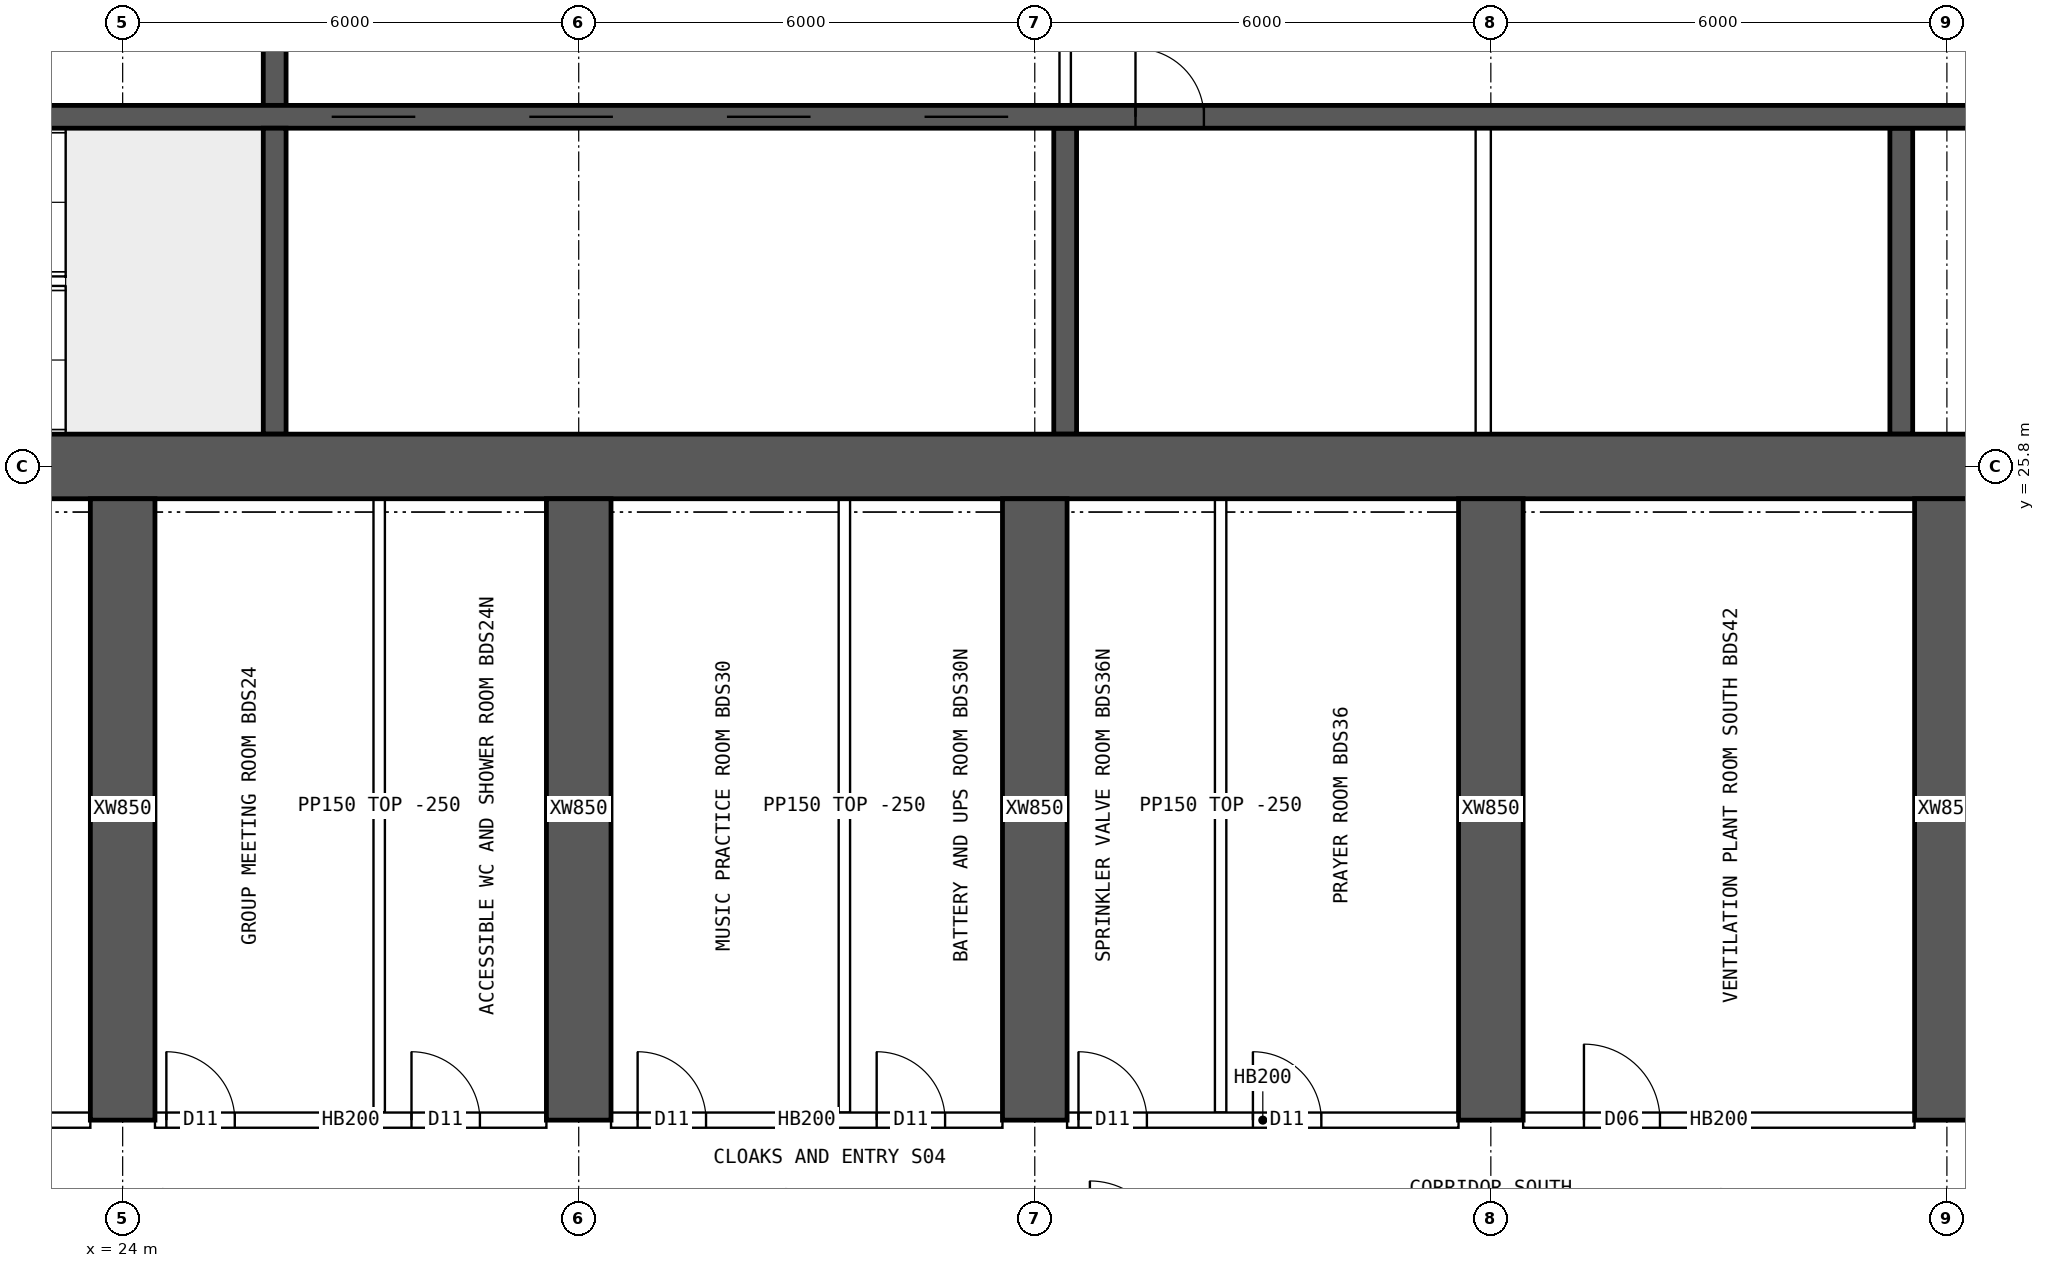
"""IFC4 building model, lengths in metres.
Left out: names, types, materials, properties, quantities, classifications, styles, units other than length and angle.
Written with IfcOpenShell. Run it as: python <this file> out.ifc"""

import sys

from ifc_helpers import new_model, si_unit, direction, frame, frame_2d, origin, place, context, subcontext, project, spatial, rectangle, extrude, element, fill, save


model = new_model("IFC4")
c1 = context("Model", 3, precision=1e-05, world=origin(), true_north=direction((0.0, 1.0)))
c2 = subcontext(c1, "Body", "Model", "MODEL_VIEW")
j1 = project(units=[si_unit("LENGTHUNIT", "METRE"), si_unit("PLANEANGLEUNIT", "RADIAN")], contexts=[c1])
p1 = place(None, origin())
s1 = spatial("IfcSite", under=j1, at=p1, CompositionType="ELEMENT")
p2 = place(p1, origin())
s2 = spatial("IfcBuilding", under=s1, at=p2, CompositionType="ELEMENT")
p3 = place(p2, frame((0.0, 0.0, 163.6)))
s3 = spatial("IfcBuildingStorey", under=s2, at=p3, CompositionType="ELEMENT", Elevation=163.6)
p4 = place(p3, frame((18.0, 25.8, 0.0), z_axis=(0.0, 0.0, 1.0), x_axis=(1.0, 0.0, 0.0)))
e1 = element("IfcWall", 1, at=p4, inside=s3, PredefinedType="SHEAR", context=c2, shape_type="SweptSolid", body=[
    extrude(rectangle(XDim=48.0, YDim=0.85, at=frame_2d((24.0, 0.0))), origin(), (0.0, 0.0, 1.0), 3.75),
])
p5 = place(p3, frame((18.425, 30.4, 0.0), z_axis=(0.0, 0.0, 1.0), x_axis=(1.0, 0.0, 0.0)))
e2 = element("IfcWall", 2, at=p5, inside=s3, PredefinedType="SHEAR", context=c2, shape_type="SweptSolid", body=[
    extrude(rectangle(XDim=47.15, YDim=0.3, at=frame_2d((23.575, 0.0))), origin(), (0.0, 0.0, 1.0), 3.75),
])
p6 = place(p5, frame((0.4, 0.0, 0.0)))
e3 = element("IfcOpeningElement", 3, at=p6, cuts=e2, PredefinedType="OPENING", context=c2, shape_type="SweptSolid", body=[
    extrude(rectangle(XDim=1.0, YDim=2.1, at=frame_2d((0.5, 1.05))), frame((0.0, 0.16, 0.0), z_axis=(0.0, -1.0, 0.0), x_axis=(1.0, 0.0, 0.0)), (0.0, 0.0, 1.0), 0.32),
])
p7 = place(p5, frame((45.75, 0.0, 0.0)))
e4 = element("IfcOpeningElement", 4, at=p7, cuts=e2, PredefinedType="OPENING", context=c2, shape_type="SweptSolid", body=[
    extrude(rectangle(XDim=1.0, YDim=2.1, at=frame_2d((0.5, 1.05))), frame((0.0, 0.16, 0.0), z_axis=(0.0, -1.0, 0.0), x_axis=(1.0, 0.0, 0.0)), (0.0, 0.0, 1.0), 0.32),
])
p8 = place(p5, frame((8.325, 0.0, 0.0)))
e5 = element("IfcOpeningElement", 5, at=p8, cuts=e2, PredefinedType="OPENING", context=c2, shape_type="SweptSolid", body=[
    extrude(rectangle(XDim=1.1, YDim=2.1, at=frame_2d((0.55, 1.05))), frame((0.0, 0.16, 0.0), z_axis=(0.0, -1.0, 0.0), x_axis=(1.0, 0.0, 0.0)), (0.0, 0.0, 1.0), 0.32),
])
p9 = place(p5, frame((10.925, 0.0, 0.0)))
e6 = element("IfcOpeningElement", 6, at=p9, cuts=e2, PredefinedType="OPENING", context=c2, shape_type="SweptSolid", body=[
    extrude(rectangle(XDim=1.1, YDim=2.1, at=frame_2d((0.55, 1.05))), frame((0.0, 0.16, 0.0), z_axis=(0.0, -1.0, 0.0), x_axis=(1.0, 0.0, 0.0)), (0.0, 0.0, 1.0), 0.32),
])
p10 = place(p5, frame((13.525, 0.0, 0.0)))
e7 = element("IfcOpeningElement", 7, at=p10, cuts=e2, PredefinedType="OPENING", context=c2, shape_type="SweptSolid", body=[
    extrude(rectangle(XDim=1.1, YDim=2.1, at=frame_2d((0.55, 1.05))), frame((0.0, 0.16, 0.0), z_axis=(0.0, -1.0, 0.0), x_axis=(1.0, 0.0, 0.0)), (0.0, 0.0, 1.0), 0.32),
])
p11 = place(p5, frame((16.125, 0.0, 0.0)))
e8 = element("IfcOpeningElement", 8, at=p11, cuts=e2, PredefinedType="OPENING", context=c2, shape_type="SweptSolid", body=[
    extrude(rectangle(XDim=1.1, YDim=2.1, at=frame_2d((0.55, 1.05))), frame((0.0, 0.16, 0.0), z_axis=(0.0, -1.0, 0.0), x_axis=(1.0, 0.0, 0.0)), (0.0, 0.0, 1.0), 0.32),
])
p12 = place(p5, frame((18.9, 0.0, 0.0)))
e9 = element("IfcOpeningElement", 9, at=p12, cuts=e2, PredefinedType="OPENING", context=c2, shape_type="SweptSolid", body=[
    extrude(rectangle(XDim=0.9, YDim=2.1, at=frame_2d((0.45, 1.05))), frame((0.0, 0.16, 0.0), z_axis=(0.0, -1.0, 0.0), x_axis=(1.0, 0.0, 0.0)), (0.0, 0.0, 1.0), 0.32),
])
p13 = place(p5, frame((30.192, 0.0, 0.0)))
e10 = element("IfcOpeningElement", 10, at=p13, cuts=e2, PredefinedType="OPENING", context=c2, shape_type="SweptSolid", body=[
    extrude(rectangle(XDim=1.1, YDim=2.1, at=frame_2d((0.55, 1.05))), frame((0.0, 0.16, 0.0), z_axis=(0.0, -1.0, 0.0), x_axis=(1.0, 0.0, 0.0)), (0.0, 0.0, 1.0), 0.32),
])
p14 = place(p5, frame((33.725, 0.0, 0.0)))
e11 = element("IfcOpeningElement", 11, at=p14, cuts=e2, PredefinedType="OPENING", context=c2, shape_type="SweptSolid", body=[
    extrude(rectangle(XDim=1.1, YDim=2.1, at=frame_2d((0.55, 1.05))), frame((0.0, 0.16, 0.0), z_axis=(0.0, -1.0, 0.0), x_axis=(1.0, 0.0, 0.0)), (0.0, 0.0, 1.0), 0.32),
])
p15 = place(p5, frame((37.258, 0.0, 0.0)))
e12 = element("IfcOpeningElement", 12, at=p15, cuts=e2, PredefinedType="OPENING", context=c2, shape_type="SweptSolid", body=[
    extrude(rectangle(XDim=1.1, YDim=2.1, at=frame_2d((0.55, 1.05))), frame((0.0, 0.16, 0.0), z_axis=(0.0, -1.0, 0.0), x_axis=(1.0, 0.0, 0.0)), (0.0, 0.0, 1.0), 0.32),
])
p16 = place(p3, frame((26.0, 26.225, 0.0), z_axis=(0.0, 0.0, 1.0), x_axis=(0.0, 1.0, 0.0)))
e13 = element("IfcWall", 13, at=p16, inside=s3, PredefinedType="SHEAR", context=c2, shape_type="SweptSolid", body=[
    extrude(rectangle(XDim=4.025, YDim=0.3, at=frame_2d((2.012, 0.0))), origin(), (0.0, 0.0, 1.0), 3.75),
])
p17 = place(p3, frame((26.0, 30.55, 0.0), z_axis=(0.0, 0.0, 1.0), x_axis=(0.0, 1.0, 0.0)))
e14 = element("IfcWall", 14, at=p17, inside=s3, PredefinedType="SHEAR", context=c2, shape_type="SweptSolid", body=[
    extrude(rectangle(XDim=3.9, YDim=0.3, at=frame_2d((1.95, 0.0))), origin(), (0.0, 0.0, 1.0), 3.75),
])
p18 = place(p17, frame((1.4, 0.0, 0.0)))
e15 = element("IfcOpeningElement", 15, at=p18, cuts=e14, PredefinedType="OPENING", context=c2, shape_type="SweptSolid", body=[
    extrude(rectangle(XDim=1.2, YDim=2.1, at=frame_2d((0.6, 1.05))), frame((0.0, 0.16, 0.0), z_axis=(0.0, -1.0, 0.0), x_axis=(1.0, 0.0, 0.0)), (0.0, 0.0, 1.0), 0.32),
])
for number, where, z_axis, x_axis in (
    (16, (36.4, 26.225, 0.0), (0.0, 0.0, 1.0), (0.0, 1.0, 0.0)),
    (17, (47.4, 26.225, 0.0), (0.0, 0.0, 1.0), (0.0, 1.0, 0.0)),
):
    element("IfcWall", number, at=place(p3, frame(where, z_axis=z_axis, x_axis=x_axis)), inside=s3, PredefinedType="SHEAR", context=c2, shape_type="SweptSolid", body=[
        extrude(rectangle(XDim=4.025, YDim=0.3, at=frame_2d((2.012, 0.0))), origin(), (0.0, 0.0, 1.0), 3.75),
    ])
for number, where, z_axis, x_axis in (
    (18, (24.0, 17.2, 0.0), (0.0, 0.0, 1.0), (0.0, 1.0, 0.0)),
    (19, (30.0, 17.2, 0.0), (0.0, 0.0, 1.0), (0.0, 1.0, 0.0)),
    (20, (36.0, 17.2, 0.0), (0.0, 0.0, 1.0), (0.0, 1.0, 0.0)),
    (21, (42.0, 17.2, 0.0), (0.0, 0.0, 1.0), (0.0, 1.0, 0.0)),
    (22, (48.0, 17.2, 0.0), (0.0, 0.0, 1.0), (0.0, 1.0, 0.0)),
):
    element("IfcWall", number, at=place(p3, frame(where, z_axis=z_axis, x_axis=x_axis)), inside=s3, PredefinedType="SHEAR", context=c2, shape_type="SweptSolid", body=[
        extrude(rectangle(XDim=8.175, YDim=0.85, at=frame_2d((4.087, 0.0))), origin(), (0.0, 0.0, 1.0), 3.75),
    ])
p19 = place(p3, frame((36.4, 30.55, 0.0), z_axis=(0.0, 0.0, 1.0), x_axis=(0.0, 1.0, 0.0)))
e23 = element("IfcWall", 23, at=p19, inside=s3, PredefinedType="SOLIDWALL", context=c2, shape_type="SweptSolid", body=[
    extrude(rectangle(XDim=3.9, YDim=0.15, at=frame_2d((1.95, 0.0))), origin(), (0.0, 0.0, 1.0), 3.5),
])
p20 = place(p19, frame((1.15, 0.0, 0.0)))
e24 = element("IfcOpeningElement", 24, at=p20, cuts=e23, PredefinedType="OPENING", context=c2, shape_type="SweptSolid", body=[
    extrude(rectangle(XDim=1.6, YDim=2.1, at=frame_2d((0.8, 1.05))), frame((0.0, 0.085, 0.0), z_axis=(0.0, -1.0, 0.0), x_axis=(1.0, 0.0, 0.0)), (0.0, 0.0, 1.0), 0.17),
])
p21 = place(p3, frame((41.9, 26.225, 0.0), z_axis=(0.0, 0.0, 1.0), x_axis=(0.0, 1.0, 0.0)))
e25 = element("IfcWall", 25, at=p21, inside=s3, PredefinedType="SOLIDWALL", context=c2, shape_type="SweptSolid", body=[
    extrude(rectangle(XDim=4.025, YDim=0.2, at=frame_2d((2.012, 0.0))), origin(), (0.0, 0.0, 1.0), 3.5),
])
p22 = place(p3, frame((18.425, 17.2, 0.0), z_axis=(0.0, 0.0, 1.0), x_axis=(1.0, 0.0, 0.0)))
e26 = element("IfcWall", 26, at=p22, inside=s3, PredefinedType="SOLIDWALL", context=c2, shape_type="SweptSolid", body=[
    extrude(rectangle(XDim=5.15, YDim=0.2, at=frame_2d((2.575, 0.0))), origin(), (0.0, 0.0, 1.0), 3.5),
])
p23 = place(p22, frame((0.8, 0.0, 0.0)))
e27 = element("IfcOpeningElement", 27, at=p23, cuts=e26, PredefinedType="OPENING", context=c2, shape_type="SweptSolid", body=[
    extrude(rectangle(XDim=1.0, YDim=2.1, at=frame_2d((0.5, 1.05))), frame((0.0, 0.11, 0.0), z_axis=(0.0, -1.0, 0.0), x_axis=(1.0, 0.0, 0.0)), (0.0, 0.0, 1.0), 0.22),
])
p24 = place(p3, frame((24.425, 17.2, 0.0), z_axis=(0.0, 0.0, 1.0), x_axis=(1.0, 0.0, 0.0)))
e28 = element("IfcWall", 28, at=p24, inside=s3, PredefinedType="SOLIDWALL", context=c2, shape_type="SweptSolid", body=[
    extrude(rectangle(XDim=5.15, YDim=0.2, at=frame_2d((2.575, 0.0))), origin(), (0.0, 0.0, 1.0), 3.5),
])
p25 = place(p24, frame((0.15, 0.0, 0.0)))
e29 = element("IfcOpeningElement", 29, at=p25, cuts=e28, PredefinedType="OPENING", context=c2, shape_type="SweptSolid", body=[
    extrude(rectangle(XDim=0.9, YDim=2.1, at=frame_2d((0.45, 1.05))), frame((0.0, 0.11, 0.0), z_axis=(0.0, -1.0, 0.0), x_axis=(1.0, 0.0, 0.0)), (0.0, 0.0, 1.0), 0.22),
])
p26 = place(p24, frame((3.375, 0.0, 0.0)))
e30 = element("IfcOpeningElement", 30, at=p26, cuts=e28, PredefinedType="OPENING", context=c2, shape_type="SweptSolid", body=[
    extrude(rectangle(XDim=0.9, YDim=2.1, at=frame_2d((0.45, 1.05))), frame((0.0, 0.11, 0.0), z_axis=(0.0, -1.0, 0.0), x_axis=(1.0, 0.0, 0.0)), (0.0, 0.0, 1.0), 0.22),
])
p27 = place(p3, frame((30.425, 17.2, 0.0), z_axis=(0.0, 0.0, 1.0), x_axis=(1.0, 0.0, 0.0)))
e31 = element("IfcWall", 31, at=p27, inside=s3, PredefinedType="SOLIDWALL", context=c2, shape_type="SweptSolid", body=[
    extrude(rectangle(XDim=5.15, YDim=0.2, at=frame_2d((2.575, 0.0))), origin(), (0.0, 0.0, 1.0), 3.5),
])
p28 = place(p27, frame((0.35, 0.0, 0.0)))
e32 = element("IfcOpeningElement", 32, at=p28, cuts=e31, PredefinedType="OPENING", context=c2, shape_type="SweptSolid", body=[
    extrude(rectangle(XDim=0.9, YDim=2.1, at=frame_2d((0.45, 1.05))), frame((0.0, 0.11, 0.0), z_axis=(0.0, -1.0, 0.0), x_axis=(1.0, 0.0, 0.0)), (0.0, 0.0, 1.0), 0.22),
])
p29 = place(p27, frame((3.495, 0.0, 0.0)))
e33 = element("IfcOpeningElement", 33, at=p29, cuts=e31, PredefinedType="OPENING", context=c2, shape_type="SweptSolid", body=[
    extrude(rectangle(XDim=0.9, YDim=2.1, at=frame_2d((0.45, 1.05))), frame((0.0, 0.11, 0.0), z_axis=(0.0, -1.0, 0.0), x_axis=(1.0, 0.0, 0.0)), (0.0, 0.0, 1.0), 0.22),
])
p30 = place(p3, frame((36.425, 17.2, 0.0), z_axis=(0.0, 0.0, 1.0), x_axis=(1.0, 0.0, 0.0)))
e34 = element("IfcWall", 34, at=p30, inside=s3, PredefinedType="SOLIDWALL", context=c2, shape_type="SweptSolid", body=[
    extrude(rectangle(XDim=5.15, YDim=0.2, at=frame_2d((2.575, 0.0))), origin(), (0.0, 0.0, 1.0), 3.5),
])
p31 = place(p30, frame((0.15, 0.0, 0.0)))
e35 = element("IfcOpeningElement", 35, at=p31, cuts=e34, PredefinedType="OPENING", context=c2, shape_type="SweptSolid", body=[
    extrude(rectangle(XDim=0.9, YDim=2.1, at=frame_2d((0.45, 1.05))), frame((0.0, 0.11, 0.0), z_axis=(0.0, -1.0, 0.0), x_axis=(1.0, 0.0, 0.0)), (0.0, 0.0, 1.0), 0.22),
])
p32 = place(p30, frame((2.445, 0.0, 0.0)))
e36 = element("IfcOpeningElement", 36, at=p32, cuts=e34, PredefinedType="OPENING", context=c2, shape_type="SweptSolid", body=[
    extrude(rectangle(XDim=0.9, YDim=2.1, at=frame_2d((0.45, 1.05))), frame((0.0, 0.11, 0.0), z_axis=(0.0, -1.0, 0.0), x_axis=(1.0, 0.0, 0.0)), (0.0, 0.0, 1.0), 0.22),
])
p33 = place(p3, frame((42.425, 17.2, 0.0), z_axis=(0.0, 0.0, 1.0), x_axis=(1.0, 0.0, 0.0)))
e37 = element("IfcWall", 37, at=p33, inside=s3, PredefinedType="SOLIDWALL", context=c2, shape_type="SweptSolid", body=[
    extrude(rectangle(XDim=5.15, YDim=0.2, at=frame_2d((2.575, 0.0))), origin(), (0.0, 0.0, 1.0), 3.5),
])
p34 = place(p33, frame((0.8, 0.0, 0.0)))
e38 = element("IfcOpeningElement", 38, at=p34, cuts=e37, PredefinedType="OPENING", context=c2, shape_type="SweptSolid", body=[
    extrude(rectangle(XDim=1.0, YDim=2.1, at=frame_2d((0.5, 1.05))), frame((0.0, 0.11, 0.0), z_axis=(0.0, -1.0, 0.0), x_axis=(1.0, 0.0, 0.0)), (0.0, 0.0, 1.0), 0.22),
])
for number, where, z_axis, x_axis in (
    (39, (27.375, 17.3, 0.0), (0.0, 0.0, 1.0), (0.0, 1.0, 0.0)),
    (40, (33.495, 17.3, 0.0), (0.0, 0.0, 1.0), (0.0, 1.0, 0.0)),
    (41, (38.445, 17.3, 0.0), (0.0, 0.0, 1.0), (0.0, 1.0, 0.0)),
):
    element("IfcWall", number, at=place(p3, frame(where, z_axis=z_axis, x_axis=x_axis)), inside=s3, PredefinedType="PARTITIONING", context=c2, shape_type="SweptSolid", body=[
        extrude(rectangle(XDim=8.075, YDim=0.15, at=frame_2d((4.038, 0.0))), origin(), (0.0, 0.0, 1.0), 3.5),
    ])
p35 = place(p8, origin())
e42 = element("IfcDoor", 42, at=p35, inside=s3, OperationType="DOUBLE_DOOR_SLIDING", PredefinedType="DOOR", context=c2, shape_type="SweptSolid", body=[
    extrude(rectangle(XDim=1.1, YDim=2.1, at=frame_2d((0.55, 1.05))), frame((0.0, 0.025, 0.0), z_axis=(0.0, -1.0, 0.0), x_axis=(1.0, 0.0, 0.0)), (0.0, 0.0, 1.0), 0.05),
])
fill(e5, e42)
p36 = place(p9, origin())
e43 = element("IfcDoor", 43, at=p36, inside=s3, OperationType="DOUBLE_DOOR_SLIDING", PredefinedType="DOOR", context=c2, shape_type="SweptSolid", body=[
    extrude(rectangle(XDim=1.1, YDim=2.1, at=frame_2d((0.55, 1.05))), frame((0.0, 0.025, 0.0), z_axis=(0.0, -1.0, 0.0), x_axis=(1.0, 0.0, 0.0)), (0.0, 0.0, 1.0), 0.05),
])
fill(e6, e43)
p37 = place(p10, origin())
e44 = element("IfcDoor", 44, at=p37, inside=s3, OperationType="DOUBLE_DOOR_SLIDING", PredefinedType="DOOR", context=c2, shape_type="SweptSolid", body=[
    extrude(rectangle(XDim=1.1, YDim=2.1, at=frame_2d((0.55, 1.05))), frame((0.0, 0.025, 0.0), z_axis=(0.0, -1.0, 0.0), x_axis=(1.0, 0.0, 0.0)), (0.0, 0.0, 1.0), 0.05),
])
fill(e7, e44)
p38 = place(p11, origin())
e45 = element("IfcDoor", 45, at=p38, inside=s3, OperationType="DOUBLE_DOOR_SLIDING", PredefinedType="DOOR", context=c2, shape_type="SweptSolid", body=[
    extrude(rectangle(XDim=1.1, YDim=2.1, at=frame_2d((0.55, 1.05))), frame((0.0, 0.025, 0.0), z_axis=(0.0, -1.0, 0.0), x_axis=(1.0, 0.0, 0.0)), (0.0, 0.0, 1.0), 0.05),
])
fill(e8, e45)
p39 = place(p12, origin())
e46 = element("IfcDoor", 46, at=p39, inside=s3, OperationType="SINGLE_SWING_LEFT", PredefinedType="DOOR", context=c2, shape_type="SweptSolid", body=[
    extrude(rectangle(XDim=0.9, YDim=2.1, at=frame_2d((0.45, 1.05))), frame((0.0, 0.025, 0.0), z_axis=(0.0, -1.0, 0.0), x_axis=(1.0, 0.0, 0.0)), (0.0, 0.0, 1.0), 0.05),
])
fill(e9, e46)
p40 = place(p25, origin())
e47 = element("IfcDoor", 47, at=p40, inside=s3, OperationType="SINGLE_SWING_LEFT", PredefinedType="DOOR", context=c2, shape_type="SweptSolid", body=[
    extrude(rectangle(XDim=0.9, YDim=2.1, at=frame_2d((0.45, 1.05))), frame((0.0, 0.025, 0.0), z_axis=(0.0, -1.0, 0.0), x_axis=(1.0, 0.0, 0.0)), (0.0, 0.0, 1.0), 0.05),
])
fill(e29, e47)
p41 = place(p26, origin())
e48 = element("IfcDoor", 48, at=p41, inside=s3, OperationType="SINGLE_SWING_LEFT", PredefinedType="DOOR", context=c2, shape_type="SweptSolid", body=[
    extrude(rectangle(XDim=0.9, YDim=2.1, at=frame_2d((0.45, 1.05))), frame((0.0, 0.025, 0.0), z_axis=(0.0, -1.0, 0.0), x_axis=(1.0, 0.0, 0.0)), (0.0, 0.0, 1.0), 0.05),
])
fill(e30, e48)
p42 = place(p28, origin())
e49 = element("IfcDoor", 49, at=p42, inside=s3, OperationType="SINGLE_SWING_LEFT", PredefinedType="DOOR", context=c2, shape_type="SweptSolid", body=[
    extrude(rectangle(XDim=0.9, YDim=2.1, at=frame_2d((0.45, 1.05))), frame((0.0, 0.025, 0.0), z_axis=(0.0, -1.0, 0.0), x_axis=(1.0, 0.0, 0.0)), (0.0, 0.0, 1.0), 0.05),
])
fill(e32, e49)
p43 = place(p29, origin())
e50 = element("IfcDoor", 50, at=p43, inside=s3, OperationType="SINGLE_SWING_LEFT", PredefinedType="DOOR", context=c2, shape_type="SweptSolid", body=[
    extrude(rectangle(XDim=0.9, YDim=2.1, at=frame_2d((0.45, 1.05))), frame((0.0, 0.025, 0.0), z_axis=(0.0, -1.0, 0.0), x_axis=(1.0, 0.0, 0.0)), (0.0, 0.0, 1.0), 0.05),
])
fill(e33, e50)
p44 = place(p31, origin())
e51 = element("IfcDoor", 51, at=p44, inside=s3, OperationType="SINGLE_SWING_LEFT", PredefinedType="DOOR", context=c2, shape_type="SweptSolid", body=[
    extrude(rectangle(XDim=0.9, YDim=2.1, at=frame_2d((0.45, 1.05))), frame((0.0, 0.025, 0.0), z_axis=(0.0, -1.0, 0.0), x_axis=(1.0, 0.0, 0.0)), (0.0, 0.0, 1.0), 0.05),
])
fill(e35, e51)
p45 = place(p32, origin())
e52 = element("IfcDoor", 52, at=p45, inside=s3, OperationType="SINGLE_SWING_LEFT", PredefinedType="DOOR", context=c2, shape_type="SweptSolid", body=[
    extrude(rectangle(XDim=0.9, YDim=2.1, at=frame_2d((0.45, 1.05))), frame((0.0, 0.025, 0.0), z_axis=(0.0, -1.0, 0.0), x_axis=(1.0, 0.0, 0.0)), (0.0, 0.0, 1.0), 0.05),
])
fill(e36, e52)
p46 = place(p34, origin())
e53 = element("IfcDoor", 53, at=p46, inside=s3, OperationType="SINGLE_SWING_LEFT", PredefinedType="DOOR", context=c2, shape_type="SweptSolid", body=[
    extrude(rectangle(XDim=1.0, YDim=2.1, at=frame_2d((0.5, 1.05))), frame((0.0, 0.025, 0.0), z_axis=(0.0, -1.0, 0.0), x_axis=(1.0, 0.0, 0.0)), (0.0, 0.0, 1.0), 0.05),
])
fill(e38, e53)
save(model, sys.argv[1])
